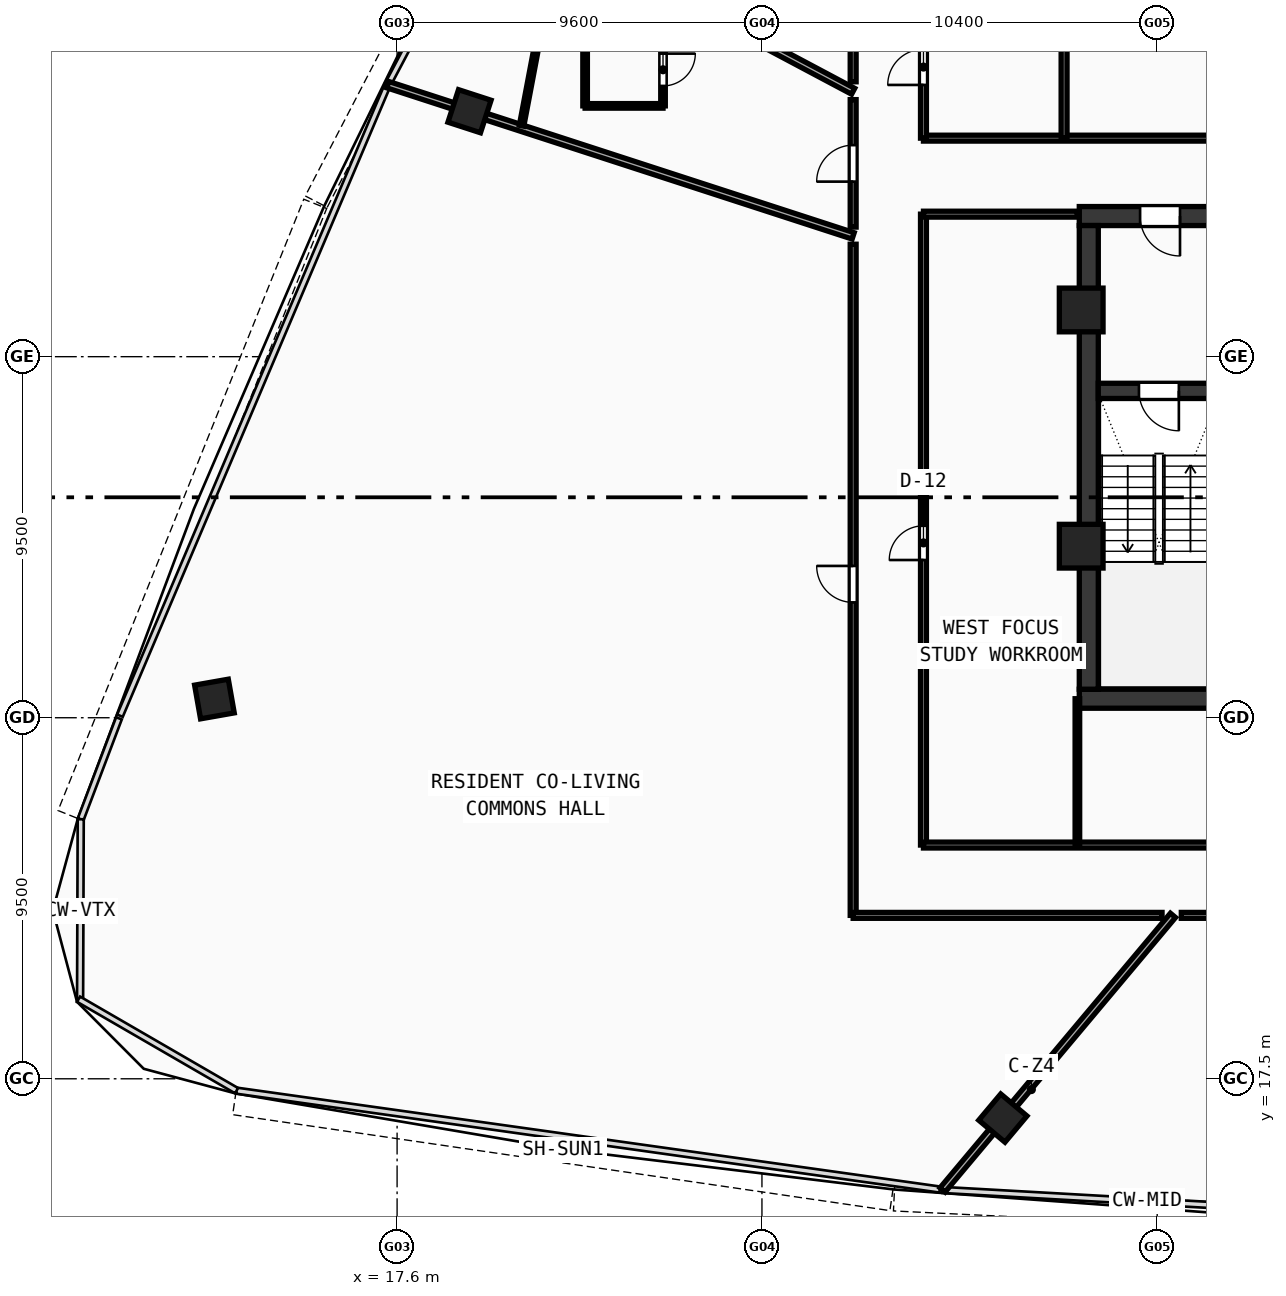
"""IFC4 building model, lengths in metres.
Left out: names, types, materials, properties, quantities, classifications, styles, units other than length and angle.
Written with IfcOpenShell. Run it as: python <this file> out.ifc"""

import sys

from ifc_helpers import new_model, si_unit, direction, frame, frame_2d, origin, origin_with_axes, origin_2d, place, context, subcontext, project, spatial, rectangle, hollow_rectangle, extrude, source, transform, mapped, element, fill, save


model = new_model("IFC4")
c1 = context("Model", 3, precision=1e-05, world=origin(), true_north=direction((0.0, 1.0)))
c2 = subcontext(c1, "Body", "Model", "MODEL_VIEW")
j1 = project(units=[si_unit("LENGTHUNIT", "METRE"), si_unit("PLANEANGLEUNIT", "RADIAN")], contexts=[c1])
p1 = place(None, origin())
s1 = spatial("IfcSite", under=j1, at=p1, CompositionType="ELEMENT")
p2 = place(p1, origin())
s2 = spatial("IfcBuilding", under=s1, at=p2, CompositionType="ELEMENT")
p3 = place(p2, frame((0.0, 0.0, 180.96)))
s3 = spatial("IfcBuildingStorey", under=s2, at=p3, CompositionType="ELEMENT", Elevation=180.96)
p4 = place(p3, frame((35.55, 27.5, 0.0), z_axis=(0.0, 0.0, 1.0), x_axis=(1.0, 0.0, 0.0)))
e1 = element("IfcWall", 1, at=p4, inside=s3, PredefinedType="SHEAR", context=c2, shape_type="SweptSolid", body=[
    extrude(rectangle(XDim=24.9, YDim=0.5, at=frame_2d((12.45, 0.0))), origin(), (0.0, 0.0, 1.0), 3.54),
])
p5 = place(p3, frame((35.55, 40.2, 0.0), z_axis=(0.0, 0.0, 1.0), x_axis=(1.0, 0.0, 0.0)))
e2 = element("IfcWall", 2, at=p5, inside=s3, PredefinedType="SHEAR", context=c2, shape_type="SweptSolid", body=[
    extrude(rectangle(XDim=11.25, YDim=0.5, at=frame_2d((5.625, 0.0))), origin(), (0.0, 0.0, 1.0), 3.54),
])
p6 = place(p5, frame((1.6, 0.0, 0.0)))
e3 = element("IfcOpeningElement", 3, at=p6, cuts=e2, PredefinedType="OPENING", context=c2, shape_type="SweptSolid", body=[
    extrude(rectangle(XDim=1.05, YDim=2.1, at=frame_2d((0.525, 1.05))), frame((0.0, 0.26, 0.0), z_axis=(0.0, -1.0, 0.0), x_axis=(1.0, 0.0, 0.0)), (0.0, 0.0, 1.0), 0.52),
])
p7 = place(p3, frame((35.8, 27.75, 0.0), z_axis=(0.0, 0.0, 1.0), x_axis=(0.0, 1.0, 0.0)))
e4 = element("IfcWall", 4, at=p7, inside=s3, PredefinedType="SHEAR", context=c2, shape_type="SweptSolid", body=[
    extrude(rectangle(XDim=12.2, YDim=0.5, at=frame_2d((6.1, 0.0))), origin(), (0.0, 0.0, 1.0), 3.54),
])
p8 = place(p3, frame((36.05, 35.6, 0.0), z_axis=(0.0, 0.0, 1.0), x_axis=(1.0, 0.0, 0.0)))
e5 = element("IfcWall", 5, at=p8, inside=s3, PredefinedType="SHEAR", context=c2, shape_type="SweptSolid", body=[
    extrude(rectangle(XDim=3.15, YDim=0.4, at=frame_2d((1.575, 0.0))), origin(), (0.0, 0.0, 1.0), 3.54),
])
p9 = place(p8, frame((1.07, 0.0, 0.0)))
e6 = element("IfcOpeningElement", 6, at=p9, cuts=e5, PredefinedType="OPENING", context=c2, shape_type="SweptSolid", body=[
    extrude(rectangle(XDim=1.05, YDim=2.1, at=frame_2d((0.525, 1.05))), frame((0.0, 0.21, 0.0), z_axis=(0.0, -1.0, 0.0), x_axis=(1.0, 0.0, 0.0)), (0.0, 0.0, 1.0), 0.42),
])
m1 = source(origin(), c2, "Body", "SweptSolid", [
    extrude(hollow_rectangle(XDim=1.15, YDim=1.15, WallThickness=0.048, at=origin_2d()), origin(), (0.0, 0.0, 1.0), 3.8),
])
for number, where, z_axis, x_axis in (
    (7, (35.6, 37.729, -0.26), (0.0, 0.0, 1.0), (1.0, 0.0, 0.0)),
    (8, (35.6, 31.513, -0.26), (0.0, 0.0, 1.0), (1.0, 0.0, 0.0)),
):
    element("IfcColumn", number, at=place(p3, frame(where, z_axis=z_axis, x_axis=x_axis)), inside=s3, PredefinedType="COLUMN", context=c2, shape_type="MappedRepresentation", body=[
        mapped(m1, transform((0.0, 0.0, 0.0), scale=1.0)),
    ])
m2 = source(origin(), c2, "Body", "SweptSolid", [
    extrude(hollow_rectangle(XDim=0.9, YDim=0.9, WallThickness=0.036, at=origin_2d()), origin(), (0.0, 0.0, 1.0), 3.8),
])
for number, where, z_axis, x_axis in (
    (9, (33.539, 16.466, -0.26), (0.0, 0.0, 1.0), (0.766, -0.643, 0.0)),
    (10, (19.505, 42.958, -0.26), (0.0, 0.0, 1.0), (-0.309, -0.951, 0.0)),
    (11, (12.793, 27.492, -0.26), (0.0, 0.0, 1.0), (0.174, -0.985, 0.0)),
):
    element("IfcColumn", number, at=place(p3, frame(where, z_axis=z_axis, x_axis=x_axis)), inside=s3, PredefinedType="COLUMN", context=c2, shape_type="MappedRepresentation", body=[
        mapped(m2, transform((0.0, 0.0, 0.0), scale=1.0)),
    ])
p10 = place(p3, frame((31.45, 42.25, 0.0), z_axis=(0.0, 0.0, 1.0), x_axis=(1.0, 0.0, 0.0)))
e12 = element("IfcWall", 12, at=p10, inside=s3, PredefinedType="PARTITIONING", context=c2, shape_type="SweptSolid", body=[
    extrude(rectangle(XDim=33.1, YDim=0.155, at=frame_2d((16.55, 0.0))), origin(), (0.0, 0.0, 1.0), 2.89),
])
p11 = place(p3, frame((31.45, 42.25, 0.0), z_axis=(0.0, 0.0, 1.0), x_axis=(0.0, 1.0, 0.0)))
e13 = element("IfcWall", 13, at=p11, inside=s3, PredefinedType="PARTITIONING", context=c2, shape_type="SweptSolid", body=[
    extrude(rectangle(XDim=11.7, YDim=0.155, at=frame_2d((5.85, 0.0))), origin(), (0.0, 0.0, 1.0), 2.89),
])
p12 = place(p11, frame((1.4, 0.0, 0.0)))
e14 = element("IfcOpeningElement", 14, at=p12, cuts=e13, PredefinedType="OPENING", context=c2, shape_type="SweptSolid", body=[
    extrude(rectangle(XDim=0.94, YDim=2.1, at=frame_2d((0.47, 1.05))), frame((0.0, 0.087, 0.0), z_axis=(0.0, -1.0, 0.0), x_axis=(1.0, 0.0, 0.0)), (0.0, 0.0, 1.0), 0.175),
])
p13 = place(p11, frame((6.8, 0.0, 0.0)))
e15 = element("IfcOpeningElement", 15, at=p13, cuts=e13, PredefinedType="OPENING", context=c2, shape_type="SweptSolid", body=[
    extrude(rectangle(XDim=0.92, YDim=2.1, at=frame_2d((0.46, 1.05))), frame((0.0, 0.087, 0.0), z_axis=(0.0, -1.0, 0.0), x_axis=(1.0, 0.0, 0.0)), (0.0, 0.0, 1.0), 0.175),
])
p14 = place(p3, frame((35.15, 42.25, 0.0), z_axis=(0.0, 0.0, 1.0), x_axis=(0.0, 1.0, 0.0)))
e16 = element("IfcWall", 16, at=p14, inside=s3, PredefinedType="PARTITIONING", context=c2, shape_type="SweptSolid", body=[
    extrude(rectangle(XDim=11.7, YDim=0.155, at=frame_2d((5.85, 0.0))), origin(), (0.0, 0.0, 1.0), 2.89),
])
p15 = place(p3, frame((31.45, 23.65, 0.0), z_axis=(0.0, 0.0, 1.0), x_axis=(0.0, 1.0, 0.0)))
e17 = element("IfcWall", 17, at=p15, inside=s3, PredefinedType="PARTITIONING", context=c2, shape_type="SweptSolid", body=[
    extrude(rectangle(XDim=16.6, YDim=0.155, at=frame_2d((8.3, 0.0))), origin(), (0.0, 0.0, 1.0), 2.89),
])
p16 = place(p15, frame((7.5, 0.0, 0.0)))
e18 = element("IfcOpeningElement", 18, at=p16, cuts=e17, PredefinedType="OPENING", context=c2, shape_type="SweptSolid", body=[
    extrude(rectangle(XDim=0.9, YDim=2.08, at=frame_2d((0.45, 1.04))), frame((0.0, 0.087, 0.0), z_axis=(0.0, -1.0, 0.0), x_axis=(1.0, 0.0, 0.0)), (0.0, 0.0, 1.0), 0.175),
])
p17 = place(p3, frame((31.45, 23.65, 0.0), z_axis=(0.0, 0.0, 1.0), x_axis=(1.0, 0.0, 0.0)))
e19 = element("IfcWall", 19, at=p17, inside=s3, PredefinedType="PARTITIONING", context=c2, shape_type="SweptSolid", body=[
    extrude(rectangle(XDim=33.1, YDim=0.155, at=frame_2d((16.55, 0.0))), origin(), (0.0, 0.0, 1.0), 2.89),
])
p18 = place(p17, frame((16.0, 0.0, 0.0)))
e20 = element("IfcOpeningElement", 20, at=p18, cuts=e19, PredefinedType="OPENING", context=c2, shape_type="SweptSolid", body=[
    extrude(rectangle(XDim=0.92, YDim=2.1, at=frame_2d((0.46, 1.05))), frame((0.0, 0.087, 0.0), z_axis=(0.0, -1.0, 0.0), x_axis=(1.0, 0.0, 0.0)), (0.0, 0.0, 1.0), 0.175),
])
p19 = place(p3, frame((31.45, 40.25, 0.0), z_axis=(0.0, 0.0, 1.0), x_axis=(1.0, 0.0, 0.0)))
e21 = element("IfcWall", 21, at=p19, inside=s3, PredefinedType="PARTITIONING", context=c2, shape_type="SweptSolid", body=[
    extrude(rectangle(XDim=4.05, YDim=0.155, at=frame_2d((2.025, 0.0))), origin(), (0.0, 0.0, 1.0), 3.54),
])
p20 = place(p3, frame((35.5, 23.65, 0.0), z_axis=(0.0, 0.0, 1.0), x_axis=(0.0, 1.0, 0.0)))
e22 = element("IfcWall", 22, at=p20, inside=s3, PredefinedType="PARTITIONING", context=c2, shape_type="SweptSolid", body=[
    extrude(rectangle(XDim=3.85, YDim=0.12, at=frame_2d((1.925, 0.0))), origin(), (0.0, 0.0, 1.0), 3.14),
])
p21 = place(p3, frame((29.6, 43.483, 0.0), z_axis=(0.0, 0.0, 1.0), x_axis=(-0.882940086537, 0.469485679853, 0.0)))
e23 = element("IfcWall", 23, at=p21, inside=s3, PredefinedType="PARTITIONING", context=c2, shape_type="SweptSolid", body=[
    extrude(rectangle(XDim=10.91, YDim=0.175, at=frame_2d((5.455, 0.0))), origin(), (0.0, 0.0, 1.0), 2.89),
])
p22 = place(p3, frame((29.6, 39.678, 0.0), z_axis=(0.0, 0.0, 1.0), x_axis=(-0.951054689993, 0.309022615097, 0.0)))
e24 = element("IfcWall", 24, at=p22, inside=s3, PredefinedType="PARTITIONING", context=c2, shape_type="SweptSolid", body=[
    extrude(rectangle(XDim=12.875, YDim=0.175, at=frame_2d((6.438, 0.0))), origin(), (0.0, 0.0, 1.0), 2.89),
])
p23 = place(p3, frame((38.015, 21.8, 0.0), z_axis=(0.0, 0.0, 1.0), x_axis=(-0.642777943688, -0.766052553751, 0.0)))
e25 = element("IfcWall", 25, at=p23, inside=s3, PredefinedType="PARTITIONING", context=c2, shape_type="SweptSolid", body=[
    extrude(rectangle(XDim=9.431, YDim=0.175, at=frame_2d((4.715, 0.0))), origin(), (0.0, 0.0, 1.0), 2.89),
])
p24 = place(p3, frame((29.6, 21.8, 0.0), z_axis=(0.0, 0.0, 1.0), x_axis=(0.0, 1.0, 0.0)))
e26 = element("IfcWall", 26, at=p24, inside=s3, PredefinedType="PARTITIONING", context=c2, shape_type="SweptSolid", body=[
    extrude(rectangle(XDim=17.659, YDim=0.155, at=frame_2d((8.829, 0.0))), origin(), (0.0, 0.0, 1.0), 2.89),
])
p25 = place(p24, frame((8.234, 0.0, 0.0)))
e27 = element("IfcOpeningElement", 27, at=p25, cuts=e26, PredefinedType="OPENING", context=c2, shape_type="SweptSolid", body=[
    extrude(rectangle(XDim=0.96, YDim=2.12, at=frame_2d((0.48, 1.06))), frame((0.0, 0.087, 0.0), z_axis=(0.0, -1.0, 0.0), x_axis=(1.0, 0.0, 0.0)), (0.0, 0.0, 1.0), 0.175),
])
p26 = place(p3, frame((29.6, 39.91, 0.0), z_axis=(0.0, 0.0, 1.0), x_axis=(0.0, 1.0, 0.0)))
e28 = element("IfcWall", 28, at=p26, inside=s3, PredefinedType="PARTITIONING", context=c2, shape_type="SweptSolid", body=[
    extrude(rectangle(XDim=3.354, YDim=0.155, at=frame_2d((1.677, 0.0))), origin(), (0.0, 0.0, 1.0), 3.54),
])
p27 = place(p26, frame((1.196, 0.0, 0.0)))
e29 = element("IfcOpeningElement", 29, at=p27, cuts=e28, PredefinedType="OPENING", context=c2, shape_type="SweptSolid", body=[
    extrude(rectangle(XDim=0.96, YDim=2.12, at=frame_2d((0.48, 1.06))), frame((0.0, 0.087, 0.0), z_axis=(0.0, -1.0, 0.0), x_axis=(1.0, 0.0, 0.0)), (0.0, 0.0, 1.0), 0.175),
])
p28 = place(p3, frame((29.6, 43.733, 0.0), z_axis=(0.0, 0.0, 1.0), x_axis=(0.0, 1.0, 0.0)))
e30 = element("IfcWall", 30, at=p28, inside=s3, PredefinedType="PARTITIONING", context=c2, shape_type="SweptSolid", body=[
    extrude(rectangle(XDim=6.315, YDim=0.155, at=frame_2d((3.157, 0.0))), origin(), (0.0, 0.0, 1.0), 2.89),
])
p29 = place(p28, frame((2.668, 0.0, 0.0)))
e31 = element("IfcOpeningElement", 31, at=p29, cuts=e30, PredefinedType="OPENING", context=c2, shape_type="SweptSolid", body=[
    extrude(rectangle(XDim=0.96, YDim=2.12, at=frame_2d((0.48, 1.06))), frame((0.0, 0.087, 0.0), z_axis=(0.0, -1.0, 0.0), x_axis=(1.0, 0.0, 0.0)), (0.0, 0.0, 1.0), 0.175),
])
p30 = place(p3, frame((44.583, 21.8, 0.0), z_axis=(0.0, 0.0, 1.0), x_axis=(-1.0, 0.0, 0.0)))
e32 = element("IfcWall", 32, at=p30, inside=s3, PredefinedType="PARTITIONING", context=c2, shape_type="SweptSolid", body=[
    extrude(rectangle(XDim=6.349, YDim=0.155, at=frame_2d((3.174, 0.0))), origin(), (0.0, 0.0, 1.0), 2.89),
])
p31 = place(p30, frame((2.696, 0.0, 0.0)))
e33 = element("IfcOpeningElement", 33, at=p31, cuts=e32, PredefinedType="OPENING", context=c2, shape_type="SweptSolid", body=[
    extrude(rectangle(XDim=0.96, YDim=2.12, at=frame_2d((0.48, 1.06))), frame((0.0, 0.087, 0.0), z_axis=(0.0, -1.0, 0.0), x_axis=(1.0, 0.0, 0.0)), (0.0, 0.0, 1.0), 0.175),
])
p32 = place(p3, frame((37.728, 21.8, 0.0), z_axis=(0.0, 0.0, 1.0), x_axis=(-1.0, 0.0, 0.0)))
e34 = element("IfcWall", 34, at=p32, inside=s3, PredefinedType="PARTITIONING", context=c2, shape_type="SweptSolid", body=[
    extrude(rectangle(XDim=8.127, YDim=0.155, at=frame_2d((4.064, 0.0))), origin(), (0.0, 0.0, 1.0), 3.14),
])
p33 = place(p3, frame((22.547, 43.099, 0.0), z_axis=(0.0, 0.0, 1.0), x_axis=(1.0, 0.0, 0.0)))
e35 = element("IfcWall", 35, at=p33, inside=s3, PredefinedType="PARTITIONING", context=c2, shape_type="SweptSolid", body=[
    extrude(rectangle(XDim=2.05, YDim=0.12, at=frame_2d((1.025, 0.0))), origin(), (0.0, 0.0, 1.0), 3.54),
])
p34 = place(p3, frame((24.597, 43.099, 0.0), z_axis=(0.0, 0.0, 1.0), x_axis=(0.0, 1.0, 0.0)))
e36 = element("IfcWall", 36, at=p34, inside=s3, PredefinedType="PARTITIONING", context=c2, shape_type="SweptSolid", body=[
    extrude(rectangle(XDim=1.9, YDim=0.12, at=frame_2d((0.95, 0.0))), origin(), (0.0, 0.0, 1.0), 3.54),
])
p35 = place(p34, frame((0.525, 0.0, 0.0)))
e37 = element("IfcOpeningElement", 37, at=p35, cuts=e36, PredefinedType="OPENING", context=c2, shape_type="SweptSolid", body=[
    extrude(rectangle(XDim=0.85, YDim=2.1, at=frame_2d((0.425, 1.05))), frame((0.0, 0.07, 0.0), z_axis=(0.0, -1.0, 0.0), x_axis=(1.0, 0.0, 0.0)), (0.0, 0.0, 1.0), 0.14),
])
p36 = place(p3, frame((22.547, 44.999, 0.0), z_axis=(0.0, 0.0, 1.0), x_axis=(0.0, -1.0, 0.0)))
e38 = element("IfcWall", 38, at=p36, inside=s3, PredefinedType="PARTITIONING", context=c2, shape_type="SweptSolid", body=[
    extrude(rectangle(XDim=1.9, YDim=0.12, at=frame_2d((0.95, 0.0))), origin(), (0.0, 0.0, 1.0), 3.54),
])
p37 = place(p3, frame((21.818, 47.553, 0.0), z_axis=(0.0, 0.0, 1.0), x_axis=(-0.186234987185, -0.982505231308, 0.0)))
e39 = element("IfcWall", 39, at=p37, inside=s3, PredefinedType="PARTITIONING", context=c2, shape_type="SweptSolid", body=[
    extrude(rectangle(XDim=5.065, YDim=0.12, at=frame_2d((2.533, 0.0))), origin(), (0.0, 0.0, 1.0), 2.89),
])
p38 = place(p37, frame((2.073, 0.0, 0.0)))
e40 = element("IfcOpeningElement", 40, at=p38, cuts=e39, PredefinedType="OPENING", context=c2, shape_type="SweptSolid", body=[
    extrude(rectangle(XDim=0.92, YDim=2.1, at=frame_2d((0.46, 1.05))), frame((0.0, 0.07, 0.0), z_axis=(0.0, -1.0, 0.0), x_axis=(1.0, 0.0, 0.0)), (0.0, 0.0, 1.0), 0.14),
])
m3 = source(origin(), c2, "Body", "SweptSolid", [
    extrude(rectangle(XDim=1.05, YDim=2.1, at=frame_2d((0.525, 1.05))), frame((0.0, 0.025, 0.0), z_axis=(0.0, -1.0, 0.0), x_axis=(1.0, 0.0, 0.0)), (0.0, 0.0, 1.0), 0.05),
])
p39 = place(p9, frame((1.05, 0.0, 0.0), z_axis=(0.0, 0.0, 1.0), x_axis=(-1.0, 0.0, 0.0)))
e41 = element("IfcDoor", 41, at=p39, inside=s3, OperationType="SINGLE_SWING_LEFT", PredefinedType="DOOR", context=c2, shape_type="MappedRepresentation", body=[
    mapped(m3, transform((0.0, 0.0, 0.0), scale=1.0)),
])
fill(e6, e41)
p40 = place(p6, frame((1.05, 0.0, 0.0), z_axis=(0.0, 0.0, 1.0), x_axis=(-1.0, 0.0, 0.0)))
e42 = element("IfcDoor", 42, at=p40, inside=s3, OperationType="SINGLE_SWING_LEFT", PredefinedType="DOOR", context=c2, shape_type="MappedRepresentation", body=[
    mapped(m3, transform((0.0, 0.0, 0.0), scale=1.0)),
])
fill(e3, e42)
m4 = source(origin(), c2, "Body", "SweptSolid", [
    extrude(rectangle(XDim=0.94, YDim=2.1, at=frame_2d((0.47, 1.05))), frame((0.0, 0.025, 0.0), z_axis=(0.0, -1.0, 0.0), x_axis=(1.0, 0.0, 0.0)), (0.0, 0.0, 1.0), 0.05),
])
p41 = place(p12, origin_with_axes())
e43 = element("IfcDoor", 43, at=p41, inside=s3, OperationType="SINGLE_SWING_LEFT", PredefinedType="DOOR", context=c2, shape_type="MappedRepresentation", body=[
    mapped(m4, transform((0.0, 0.0, 0.0), scale=1.0)),
])
fill(e14, e43)
m5 = source(origin(), c2, "Body", "SweptSolid", [
    extrude(rectangle(XDim=0.9, YDim=2.08, at=frame_2d((0.45, 1.04))), frame((0.0, 0.025, 0.0), z_axis=(0.0, -1.0, 0.0), x_axis=(1.0, 0.0, 0.0)), (0.0, 0.0, 1.0), 0.05),
])
p42 = place(p16, origin_with_axes())
e44 = element("IfcDoor", 44, at=p42, inside=s3, OperationType="SINGLE_SWING_LEFT", PredefinedType="DOOR", context=c2, shape_type="MappedRepresentation", body=[
    mapped(m5, transform((0.0, 0.0, 0.0), scale=1.0)),
])
fill(e18, e44)
m6 = source(origin(), c2, "Body", "SweptSolid", [
    extrude(rectangle(XDim=0.96, YDim=2.12, at=frame_2d((0.48, 1.06))), frame((0.0, 0.025, 0.0), z_axis=(0.0, -1.0, 0.0), x_axis=(1.0, 0.0, 0.0)), (0.0, 0.0, 1.0), 0.05),
])
p43 = place(p27, origin_with_axes())
e45 = element("IfcDoor", 45, at=p43, inside=s3, OperationType="SINGLE_SWING_LEFT", PredefinedType="DOOR", context=c2, shape_type="MappedRepresentation", body=[
    mapped(m6, transform((0.0, 0.0, 0.0), scale=1.0)),
])
fill(e29, e45)
m7 = source(origin(), c2, "Body", "SweptSolid", [
    extrude(rectangle(XDim=0.85, YDim=2.1, at=frame_2d((0.425, 1.05))), frame((0.0, 0.025, 0.0), z_axis=(0.0, -1.0, 0.0), x_axis=(1.0, 0.0, 0.0)), (0.0, 0.0, 1.0), 0.05),
])
p44 = place(p35, frame((0.85, 0.0, 0.0), z_axis=(0.0, 0.0, 1.0), x_axis=(-1.0, 0.0, 0.0)))
e46 = element("IfcDoor", 46, at=p44, inside=s3, OperationType="SINGLE_SWING_LEFT", PredefinedType="DOOR", context=c2, shape_type="MappedRepresentation", body=[
    mapped(m7, transform((0.0, 0.0, 0.0), scale=1.0)),
])
fill(e37, e46)
p45 = place(p25, origin_with_axes())
e47 = element("IfcDoor", 47, at=p45, inside=s3, OperationType="SINGLE_SWING_RIGHT", PredefinedType="DOOR", context=c2, shape_type="MappedRepresentation", body=[
    mapped(m6, transform((0.0, 0.0, 0.0), scale=1.0)),
])
fill(e27, e47)
save(model, sys.argv[1])
